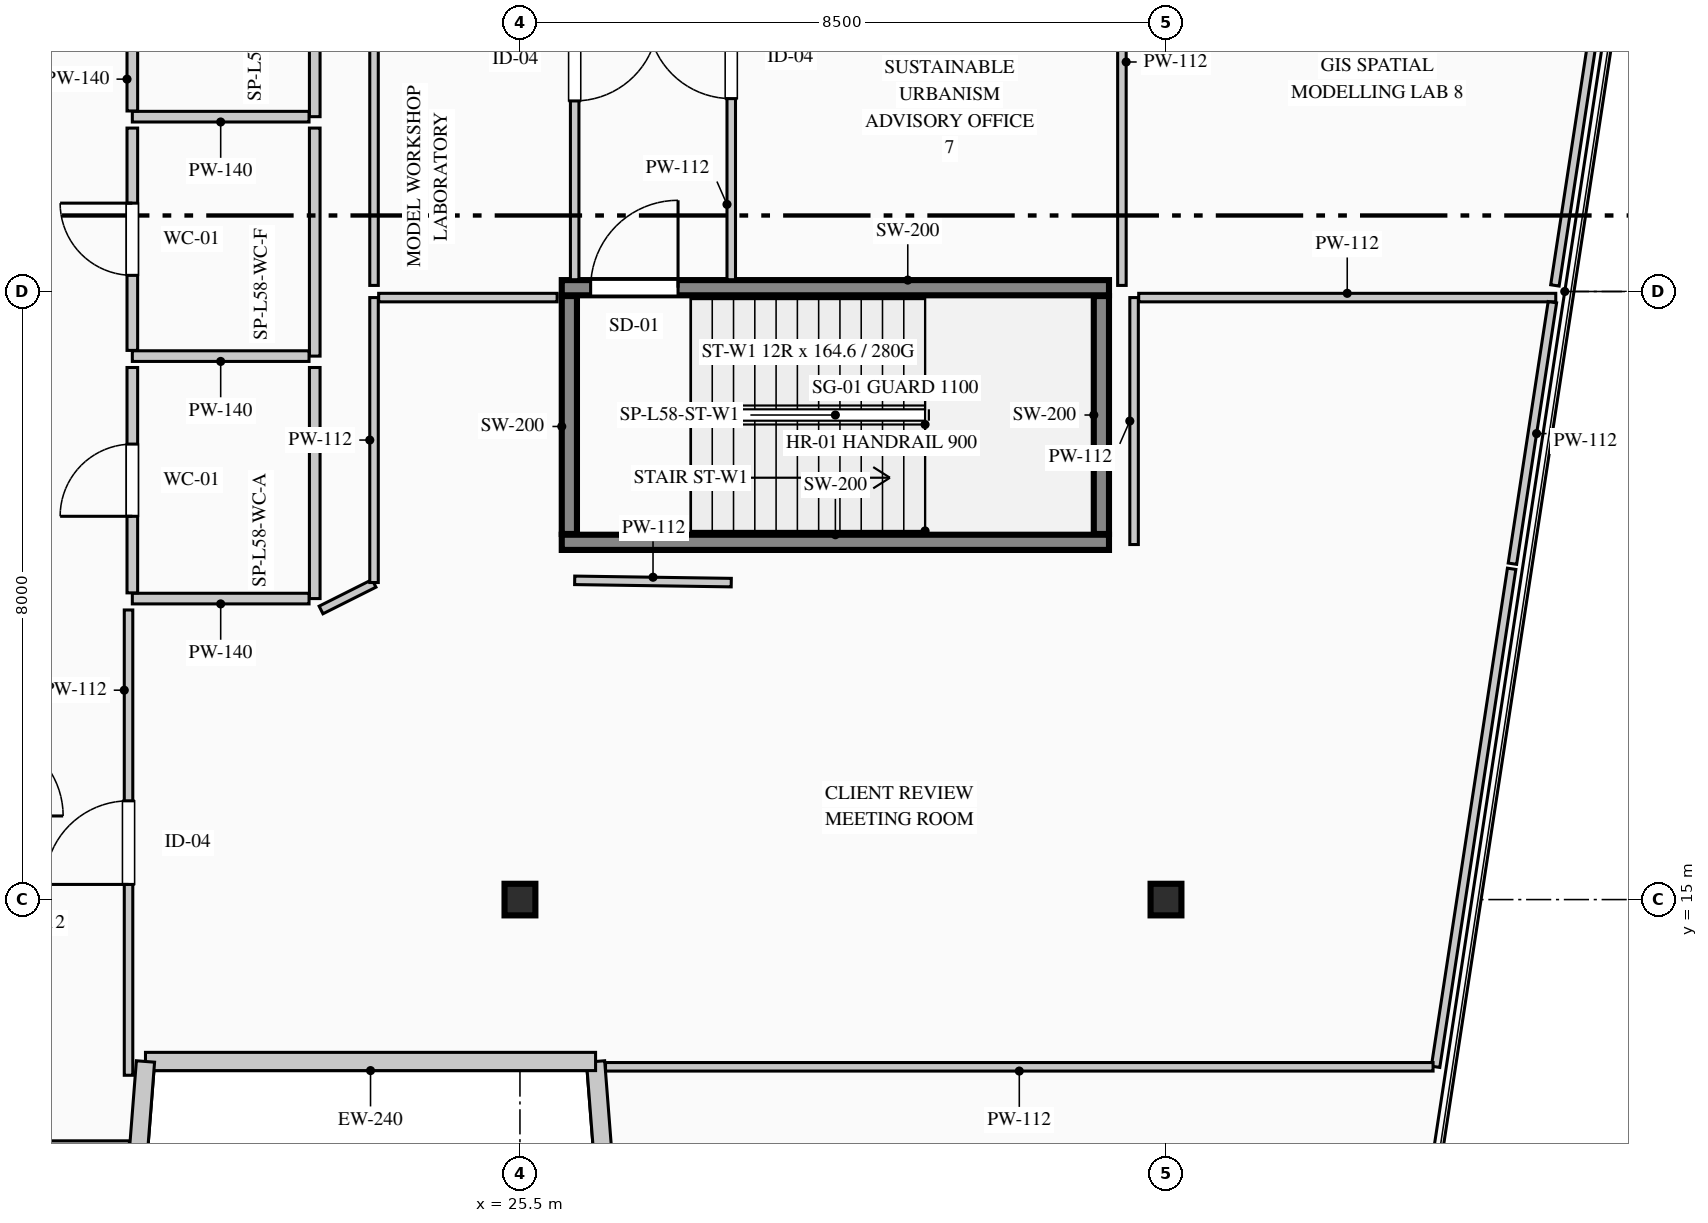
"""IFC4 building model, lengths in metres.
Left out: names, types, materials, properties, quantities, classifications, styles, units other than length and angle.
Written with IfcOpenShell. Run it as: python <this file> out.ifc"""

import sys

from ifc_helpers import new_model, si_unit, direction, frame, frame_2d, origin, origin_2d, place, context, subcontext, project, spatial, rectangle, i_section, extrude, element, fill, save


model = new_model("IFC4")
c1 = context("Model", 3, precision=1e-05, world=origin(), true_north=direction((0.0, 1.0)))
c2 = subcontext(c1, "Body", "Model", "MODEL_VIEW")
j1 = project(units=[si_unit("LENGTHUNIT", "METRE"), si_unit("PLANEANGLEUNIT", "RADIAN")], contexts=[c1])
p1 = place(None, origin())
s1 = spatial("IfcSite", under=j1, at=p1, CompositionType="ELEMENT")
p2 = place(p1, origin())
s2 = spatial("IfcBuilding", under=s1, at=p2, CompositionType="ELEMENT")
p3 = place(p2, frame((0.0, 0.0, 243.0)))
s3 = spatial("IfcBuildingStorey", under=s2, at=p3, CompositionType="ELEMENT", Elevation=243.0)
p4 = place(p3, frame((26.05, 19.7, 0.0), z_axis=(0.0, 0.0, 1.0), x_axis=(1.0, 0.0, 0.0)))
e1 = element("IfcWall", 1, at=p4, inside=s3, PredefinedType="SHEAR", context=c2, shape_type="SweptSolid", body=[
    extrude(rectangle(XDim=7.2, YDim=0.2, at=frame_2d((3.6, 0.0))), origin(), (0.0, 0.0, 1.0), 3.95),
])
p5 = place(p3, frame((26.05, 23.05, 0.0), z_axis=(0.0, 0.0, 1.0), x_axis=(1.0, 0.0, 0.0)))
e2 = element("IfcWall", 2, at=p5, inside=s3, PredefinedType="SHEAR", context=c2, shape_type="SweptSolid", body=[
    extrude(rectangle(XDim=7.2, YDim=0.2, at=frame_2d((3.6, 0.0))), origin(), (0.0, 0.0, 1.0), 3.95),
])
p6 = place(p5, frame((0.38, 0.0, 0.0)))
e3 = element("IfcOpeningElement", 3, at=p6, cuts=e2, PredefinedType="OPENING", context=c2, shape_type="SweptSolid", body=[
    extrude(rectangle(XDim=1.15, YDim=2.2, at=frame_2d((0.575, 1.1))), frame((0.0, 0.11, 0.0), z_axis=(0.0, -1.0, 0.0), x_axis=(1.0, 0.0, 0.0)), (0.0, 0.0, 1.0), 0.22),
])
for number, where, z_axis, x_axis in (
    (4, (26.15, 19.81, 0.0), (0.0, 0.0, 1.0), (0.0, 1.0, 0.0)),
    (5, (33.15, 19.81, 0.0), (0.0, 0.0, 1.0), (0.0, 1.0, 0.0)),
):
    element("IfcWall", number, at=place(p3, frame(where, z_axis=z_axis, x_axis=x_axis)), inside=s3, PredefinedType="SHEAR", context=c2, shape_type="SweptSolid", body=[
        extrude(rectangle(XDim=3.13, YDim=0.2, at=frame_2d((1.565, 0.0))), origin(), (0.0, 0.0, 1.0), 3.95),
    ])
for number, where, z_axis, x_axis in (
    (6, (25.5, 15.0, 0.0), (0.0, 0.0, 1.0), (1.0, 0.0, 0.0)),
    (7, (34.0, 15.0, 0.0), (0.0, 0.0, 1.0), (1.0, 0.0, 0.0)),
):
    element("IfcColumn", number, at=place(p3, frame(where, z_axis=z_axis, x_axis=x_axis)), inside=s3, PredefinedType="COLUMN", context=c2, shape_type="SweptSolid", body=[
        extrude(i_section(OverallWidth=0.406, OverallDepth=0.416, WebThickness=0.03, FlangeThickness=0.048, FilletRadius=0.015, at=origin_2d()), origin(), (0.0, 0.0, 1.0), 3.95),
    ])
p7 = place(p3, frame((27.295, 2.62, 0.0), z_axis=(0.0, 0.0, 1.0), x_axis=(-0.077793257511, 0.996969512616, 0.0)))
e8 = element("IfcWall", 8, at=p7, inside=s3, PredefinedType="STANDARD", context=c2, shape_type="SweptSolid", body=[
    extrude(rectangle(XDim=10.281, YDim=0.24, at=frame_2d((5.141, 0.0))), origin(), (0.0, 0.0, 1.0), 3.7),
])
p8 = place(p7, frame((5.755, 0.0, 0.9)))
e9 = element("IfcOpeningElement", 9, at=p8, cuts=e8, PredefinedType="OPENING", context=c2, shape_type="SweptSolid", body=[
    extrude(rectangle(XDim=1.65, YDim=1.95, at=frame_2d((0.825, 0.975))), frame((0.0, 0.13, 0.0), z_axis=(0.0, -1.0, 0.0), x_axis=(1.0, 0.0, 0.0)), (0.0, 0.0, 1.0), 0.26),
])
p9 = place(p3, frame((26.495, 12.87, 0.0), z_axis=(0.0, 0.0, 1.0), x_axis=(-1.0, 0.0, 0.0)))
e10 = element("IfcWall", 10, at=p9, inside=s3, PredefinedType="STANDARD", context=c2, shape_type="SweptSolid", body=[
    extrude(rectangle(XDim=5.922, YDim=0.24, at=frame_2d((2.961, 0.0))), origin(), (0.0, 0.0, 1.0), 3.7),
])
p10 = place(p3, frame((20.573, 12.87, 0.0), z_axis=(0.0, 0.0, 1.0), x_axis=(-0.077816860153, -0.996967670627, 0.0)))
e11 = element("IfcWall", 11, at=p10, inside=s3, PredefinedType="STANDARD", context=c2, shape_type="SweptSolid", body=[
    extrude(rectangle(XDim=10.281, YDim=0.24, at=frame_2d((5.141, 0.0))), origin(), (0.0, 0.0, 1.0), 3.7),
])
p11 = place(p10, frame((2.876, 0.0, 0.9)))
e12 = element("IfcOpeningElement", 12, at=p11, cuts=e11, PredefinedType="OPENING", context=c2, shape_type="SweptSolid", body=[
    extrude(rectangle(XDim=1.65, YDim=1.95, at=frame_2d((0.825, 0.975))), frame((0.0, 0.13, 0.0), z_axis=(0.0, -1.0, 0.0), x_axis=(1.0, 0.0, 0.0)), (0.0, 0.0, 1.0), 0.26),
])
p12 = place(p3, frame((22.8, 28.95, 0.0), z_axis=(0.0, 0.0, 1.0), x_axis=(0.0, -1.0, 0.0)))
e13 = element("IfcWall", 13, at=p12, inside=s3, PredefinedType="PARTITIONING", context=c2, shape_type="SweptSolid", body=[
    extrude(rectangle(XDim=3.65, YDim=0.14, at=frame_2d((1.825, 0.0))), origin(), (0.0, 0.0, 1.0), 3.385),
])
p13 = place(p3, frame((22.725, 25.3, 0.0), z_axis=(0.0, 0.0, 1.0), x_axis=(-1.0, 0.0, 0.0)))
e14 = element("IfcWall", 14, at=p13, inside=s3, PredefinedType="PARTITIONING", context=c2, shape_type="SweptSolid", body=[
    extrude(rectangle(XDim=2.325, YDim=0.14, at=frame_2d((1.163, 0.0))), origin(), (0.0, 0.0, 1.0), 3.7),
])
p14 = place(p3, frame((20.4, 25.375, 0.0), z_axis=(0.0, 0.0, 1.0), x_axis=(0.0, 1.0, 0.0)))
e15 = element("IfcWall", 15, at=p14, inside=s3, PredefinedType="PARTITIONING", context=c2, shape_type="SweptSolid", body=[
    extrude(rectangle(XDim=3.575, YDim=0.14, at=frame_2d((1.788, 0.0))), origin(), (0.0, 0.0, 1.0), 3.7),
])
p15 = place(p14, frame((1.312, 0.0, 0.0)))
e16 = element("IfcOpeningElement", 16, at=p15, cuts=e15, PredefinedType="OPENING", context=c2, shape_type="SweptSolid", body=[
    extrude(rectangle(XDim=0.95, YDim=2.15, at=frame_2d((0.475, 1.075))), frame((0.0, 0.08, 0.0), z_axis=(0.0, -1.0, 0.0), x_axis=(1.0, 0.0, 0.0)), (0.0, 0.0, 1.0), 0.16),
])
p16 = place(p3, frame((22.8, 25.15, 0.0), z_axis=(0.0, 0.0, 1.0), x_axis=(0.0, -1.0, 0.0)))
e17 = element("IfcWall", 17, at=p16, inside=s3, PredefinedType="PARTITIONING", context=c2, shape_type="SweptSolid", body=[
    extrude(rectangle(XDim=3.0, YDim=0.14, at=frame_2d((1.5, 0.0))), origin(), (0.0, 0.0, 1.0), 3.385),
])
p17 = place(p3, frame((22.725, 22.15, 0.0), z_axis=(0.0, 0.0, 1.0), x_axis=(-1.0, 0.0, 0.0)))
e18 = element("IfcWall", 18, at=p17, inside=s3, PredefinedType="PARTITIONING", context=c2, shape_type="SweptSolid", body=[
    extrude(rectangle(XDim=2.325, YDim=0.14, at=frame_2d((1.163, 0.0))), origin(), (0.0, 0.0, 1.0), 3.7),
])
p18 = place(p3, frame((20.4, 22.225, 0.0), z_axis=(0.0, 0.0, 1.0), x_axis=(0.0, 1.0, 0.0)))
e19 = element("IfcWall", 19, at=p18, inside=s3, PredefinedType="PARTITIONING", context=c2, shape_type="SweptSolid", body=[
    extrude(rectangle(XDim=2.925, YDim=0.14, at=frame_2d((1.462, 0.0))), origin(), (0.0, 0.0, 1.0), 3.7),
])
p19 = place(p18, frame((0.988, 0.0, 0.0)))
e20 = element("IfcOpeningElement", 20, at=p19, cuts=e19, PredefinedType="OPENING", context=c2, shape_type="SweptSolid", body=[
    extrude(rectangle(XDim=0.95, YDim=2.15, at=frame_2d((0.475, 1.075))), frame((0.0, 0.08, 0.0), z_axis=(0.0, -1.0, 0.0), x_axis=(1.0, 0.0, 0.0)), (0.0, 0.0, 1.0), 0.16),
])
p20 = place(p3, frame((22.8, 22.0, 0.0), z_axis=(0.0, 0.0, 1.0), x_axis=(0.0, -1.0, 0.0)))
e21 = element("IfcWall", 21, at=p20, inside=s3, PredefinedType="PARTITIONING", context=c2, shape_type="SweptSolid", body=[
    extrude(rectangle(XDim=3.04, YDim=0.14, at=frame_2d((1.52, 0.0))), origin(), (0.0, 0.0, 1.0), 3.385),
])
p21 = place(p3, frame((22.725, 18.96, 0.0), z_axis=(0.0, 0.0, 1.0), x_axis=(-1.0, 0.0, 0.0)))
e22 = element("IfcWall", 22, at=p21, inside=s3, PredefinedType="PARTITIONING", context=c2, shape_type="SweptSolid", body=[
    extrude(rectangle(XDim=2.325, YDim=0.14, at=frame_2d((1.163, 0.0))), origin(), (0.0, 0.0, 1.0), 3.7),
])
p22 = place(p3, frame((20.4, 19.035, 0.0), z_axis=(0.0, 0.0, 1.0), x_axis=(0.0, 1.0, 0.0)))
e23 = element("IfcWall", 23, at=p22, inside=s3, PredefinedType="PARTITIONING", context=c2, shape_type="SweptSolid", body=[
    extrude(rectangle(XDim=2.965, YDim=0.14, at=frame_2d((1.482, 0.0))), origin(), (0.0, 0.0, 1.0), 3.7),
])
p23 = place(p22, frame((1.008, 0.0, 0.0)))
e24 = element("IfcOpeningElement", 24, at=p23, cuts=e23, PredefinedType="OPENING", context=c2, shape_type="SweptSolid", body=[
    extrude(rectangle(XDim=0.95, YDim=2.15, at=frame_2d((0.475, 1.075))), frame((0.0, 0.08, 0.0), z_axis=(0.0, -1.0, 0.0), x_axis=(1.0, 0.0, 0.0)), (0.0, 0.0, 1.0), 0.16),
])
p24 = place(p3, frame((13.641, 11.77, 0.0), z_axis=(0.0, 0.0, 1.0), x_axis=(1.0, 0.0, 0.0)))
e25 = element("IfcWall", 25, at=p24, inside=s3, PredefinedType="PARTITIONING", context=c2, shape_type="SweptSolid", body=[
    extrude(rectangle(XDim=6.721, YDim=0.112, at=frame_2d((3.36, 0.0))), origin(), (0.0, 0.0, 1.0), 3.7),
])
p25 = place(p24, frame((2.81, 0.0, 0.0)))
e26 = element("IfcOpeningElement", 26, at=p25, cuts=e25, PredefinedType="OPENING", context=c2, shape_type="SweptSolid", body=[
    extrude(rectangle(XDim=1.1, YDim=2.2, at=frame_2d((0.55, 1.1))), frame((0.0, 0.066, 0.0), z_axis=(0.0, -1.0, 0.0), x_axis=(1.0, 0.0, 0.0)), (0.0, 0.0, 1.0), 0.132),
])
p26 = place(p3, frame((33.58, 19.671, 0.0), z_axis=(0.0, 0.0, 1.0), x_axis=(0.0, 1.0, 0.0)))
e27 = element("IfcWall", 27, at=p26, inside=s3, PredefinedType="PARTITIONING", context=c2, shape_type="SweptSolid", body=[
    extrude(rectangle(XDim=3.249, YDim=0.112, at=frame_2d((1.625, 0.0))), origin(), (0.0, 0.0, 1.0), 3.7),
])
p27 = place(p3, frame((33.641, 22.92, 0.0), z_axis=(0.0, 0.0, 1.0), x_axis=(1.0, 0.0, 0.0)))
e28 = element("IfcWall", 28, at=p27, inside=s3, PredefinedType="PARTITIONING", context=c2, shape_type="SweptSolid", body=[
    extrude(rectangle(XDim=5.487, YDim=0.112, at=frame_2d((2.744, 0.0))), origin(), (0.0, 0.0, 1.0), 3.7),
])
p28 = place(p3, frame((39.084, 22.859, 0.0), z_axis=(0.0, 0.0, 1.0), x_axis=(-0.151050155671, -0.988526100046, 0.0)))
e29 = element("IfcWall", 29, at=p28, inside=s3, PredefinedType="PARTITIONING", context=c2, shape_type="SweptSolid", body=[
    extrude(rectangle(XDim=3.48, YDim=0.112, at=frame_2d((1.74, 0.0))), origin(), (0.0, 0.0, 1.0), 3.7),
])
p29 = place(p3, frame((38.548, 19.352, 0.0), z_axis=(0.0, 0.0, 1.0), x_axis=(-0.150955405806, -0.988540573501, 0.0)))
e30 = element("IfcWall", 30, at=p29, inside=s3, PredefinedType="PARTITIONING", context=c2, shape_type="SweptSolid", body=[
    extrude(rectangle(XDim=6.628, YDim=0.112, at=frame_2d((3.314, 0.0))), origin(), (0.0, 0.0, 1.0), 3.7),
])
p30 = place(p3, frame((37.514, 12.8, 0.0), z_axis=(0.0, 0.0, 1.0), x_axis=(-1.0, 0.0, 0.0)))
e31 = element("IfcWall", 31, at=p30, inside=s3, PredefinedType="PARTITIONING", context=c2, shape_type="SweptSolid", body=[
    extrude(rectangle(XDim=10.888, YDim=0.112, at=frame_2d((5.444, 0.0))), origin(), (0.0, 0.0, 1.0), 3.7),
])
p31 = place(p3, frame((20.35, 12.689, 0.0), z_axis=(0.0, 0.0, 1.0), x_axis=(0.0, 1.0, 0.0)))
e32 = element("IfcWall", 32, at=p31, inside=s3, PredefinedType="PARTITIONING", context=c2, shape_type="SweptSolid", body=[
    extrude(rectangle(XDim=6.121, YDim=0.112, at=frame_2d((3.061, 0.0))), origin(), (0.0, 0.0, 1.0), 3.7),
])
p32 = place(p31, frame((2.511, 0.0, 0.0)))
e33 = element("IfcOpeningElement", 33, at=p32, cuts=e32, PredefinedType="OPENING", context=c2, shape_type="SweptSolid", body=[
    extrude(rectangle(XDim=1.1, YDim=2.2, at=frame_2d((0.55, 1.1))), frame((0.0, 0.066, 0.0), z_axis=(0.0, -1.0, 0.0), x_axis=(1.0, 0.0, 0.0)), (0.0, 0.0, 1.0), 0.132),
])
p33 = place(p3, frame((22.883, 18.81, 0.0), z_axis=(0.0, 0.0, 1.0), x_axis=(0.893737436086, 0.448590453909, 0.0)))
e34 = element("IfcWall", 34, at=p33, inside=s3, PredefinedType="PARTITIONING", context=c2, shape_type="SweptSolid", body=[
    extrude(rectangle(XDim=0.78, YDim=0.112, at=frame_2d((0.39, 0.0))), origin(), (0.0, 0.0, 1.0), 3.7),
])
p34 = place(p3, frame((23.58, 19.171, 0.0), z_axis=(0.0, 0.0, 1.0), x_axis=(0.0, 1.0, 0.0)))
e35 = element("IfcWall", 35, at=p34, inside=s3, PredefinedType="PARTITIONING", context=c2, shape_type="SweptSolid", body=[
    extrude(rectangle(XDim=3.749, YDim=0.112, at=frame_2d((1.875, 0.0))), origin(), (0.0, 0.0, 1.0), 3.7),
])
p35 = place(p3, frame((23.641, 22.92, 0.0), z_axis=(0.0, 0.0, 1.0), x_axis=(1.0, 0.0, 0.0)))
e36 = element("IfcWall", 36, at=p35, inside=s3, PredefinedType="PARTITIONING", context=c2, shape_type="SweptSolid", body=[
    extrude(rectangle(XDim=2.348, YDim=0.112, at=frame_2d((1.174, 0.0))), origin(), (0.0, 0.0, 1.0), 3.7),
])
p36 = place(p3, frame((26.22, 19.2, 0.0), z_axis=(0.0, 0.0, 1.0), x_axis=(0.999893773718, -0.014575365509, 0.0)))
e37 = element("IfcWall", 37, at=p36, inside=s3, PredefinedType="PARTITIONING", context=c2, shape_type="SweptSolid", body=[
    extrude(rectangle(XDim=2.06, YDim=0.112, at=frame_2d((1.03, 0.0))), origin(), (0.0, 0.0, 1.0), 3.385),
])
p37 = place(p3, frame((23.58, 23.08, 0.0), z_axis=(0.0, 0.0, 1.0), x_axis=(0.0, 1.0, 0.0)))
e38 = element("IfcWall", 38, at=p37, inside=s3, PredefinedType="PARTITIONING", context=c2, shape_type="SweptSolid", body=[
    extrude(rectangle(XDim=5.94, YDim=0.112, at=frame_2d((2.97, 0.0))), origin(), (0.0, 0.0, 1.0), 3.7),
])
p38 = place(p3, frame((26.22, 28.959, 0.0), z_axis=(0.0, 0.0, 1.0), x_axis=(0.0, -1.0, 0.0)))
e39 = element("IfcWall", 39, at=p38, inside=s3, PredefinedType="PARTITIONING", context=c2, shape_type="SweptSolid", body=[
    extrude(rectangle(XDim=5.804, YDim=0.112, at=frame_2d((2.902, 0.0))), origin(), (0.0, 0.0, 1.0), 3.7),
])
p39 = place(p38, frame((2.352, 0.0, 0.0)))
e40 = element("IfcOpeningElement", 40, at=p39, cuts=e39, PredefinedType="OPENING", context=c2, shape_type="SweptSolid", body=[
    extrude(rectangle(XDim=1.1, YDim=2.2, at=frame_2d((0.55, 1.1))), frame((0.0, 0.066, 0.0), z_axis=(0.0, -1.0, 0.0), x_axis=(1.0, 0.0, 0.0)), (0.0, 0.0, 1.0), 0.132),
])
p40 = place(p3, frame((28.28, 23.155, 0.0), z_axis=(0.0, 0.0, 1.0), x_axis=(0.0, 1.0, 0.0)))
e41 = element("IfcWall", 41, at=p40, inside=s3, PredefinedType="PARTITIONING", context=c2, shape_type="SweptSolid", body=[
    extrude(rectangle(XDim=5.865, YDim=0.112, at=frame_2d((2.933, 0.0))), origin(), (0.0, 0.0, 1.0), 3.7),
])
p41 = place(p40, frame((2.383, 0.0, 0.0)))
e42 = element("IfcOpeningElement", 42, at=p41, cuts=e41, PredefinedType="OPENING", context=c2, shape_type="SweptSolid", body=[
    extrude(rectangle(XDim=1.1, YDim=2.2, at=frame_2d((0.55, 1.1))), frame((0.0, 0.066, 0.0), z_axis=(0.0, -1.0, 0.0), x_axis=(1.0, 0.0, 0.0)), (0.0, 0.0, 1.0), 0.132),
])
p42 = place(p3, frame((33.42, 28.959, 0.0), z_axis=(0.0, 0.0, 1.0), x_axis=(0.0, -1.0, 0.0)))
e43 = element("IfcWall", 43, at=p42, inside=s3, PredefinedType="PARTITIONING", context=c2, shape_type="SweptSolid", body=[
    extrude(rectangle(XDim=5.879, YDim=0.112, at=frame_2d((2.939, 0.0))), origin(), (0.0, 0.0, 1.0), 3.7),
])
p43 = place(p3, frame((41.529, 38.867, 0.0), z_axis=(0.0, 0.0, 1.0), x_axis=(-0.151041582551, -0.98852741001, 0.0)))
e44 = element("IfcWall", 44, at=p43, inside=s3, PredefinedType="PARTITIONING", context=c2, shape_type="SweptSolid", body=[
    extrude(rectangle(XDim=15.97, YDim=0.112, at=frame_2d((7.985, 0.0))), origin(), (0.0, 0.0, 1.0), 3.7),
])
p44 = place(p6, origin())
e45 = element("IfcDoor", 45, at=p44, inside=s3, OperationType="SINGLE_SWING_RIGHT", PredefinedType="DOOR", context=c2, shape_type="SweptSolid", body=[
    extrude(rectangle(XDim=1.15, YDim=2.2, at=frame_2d((0.575, 1.1))), frame((0.0, 0.025, 0.0), z_axis=(0.0, -1.0, 0.0), x_axis=(1.0, 0.0, 0.0)), (0.0, 0.0, 1.0), 0.05),
])
fill(e3, e45)
p45 = place(p19, origin())
e46 = element("IfcDoor", 46, at=p45, inside=s3, OperationType="SINGLE_SWING_RIGHT", PredefinedType="DOOR", context=c2, shape_type="SweptSolid", body=[
    extrude(rectangle(XDim=0.95, YDim=2.15, at=frame_2d((0.475, 1.075))), frame((0.0, 0.025, 0.0), z_axis=(0.0, -1.0, 0.0), x_axis=(1.0, 0.0, 0.0)), (0.0, 0.0, 1.0), 0.05),
])
fill(e20, e46)
p46 = place(p23, origin())
e47 = element("IfcDoor", 47, at=p46, inside=s3, OperationType="SINGLE_SWING_LEFT", PredefinedType="DOOR", context=c2, shape_type="SweptSolid", body=[
    extrude(rectangle(XDim=0.95, YDim=2.15, at=frame_2d((0.475, 1.075))), frame((0.0, 0.025, 0.0), z_axis=(0.0, -1.0, 0.0), x_axis=(1.0, 0.0, 0.0)), (0.0, 0.0, 1.0), 0.05),
])
fill(e24, e47)
p47 = place(p32, origin())
e48 = element("IfcDoor", 48, at=p47, inside=s3, OperationType="SINGLE_SWING_LEFT", PredefinedType="DOOR", context=c2, shape_type="SweptSolid", body=[
    extrude(rectangle(XDim=1.1, YDim=2.2, at=frame_2d((0.55, 1.1))), frame((0.0, 0.025, 0.0), z_axis=(0.0, -1.0, 0.0), x_axis=(1.0, 0.0, 0.0)), (0.0, 0.0, 1.0), 0.05),
])
fill(e33, e48)
p48 = place(p39, origin())
e49 = element("IfcDoor", 49, at=p48, inside=s3, OperationType="SINGLE_SWING_LEFT", PredefinedType="DOOR", context=c2, shape_type="SweptSolid", body=[
    extrude(rectangle(XDim=1.1, YDim=2.2, at=frame_2d((0.55, 1.1))), frame((0.0, 0.025, 0.0), z_axis=(0.0, -1.0, 0.0), x_axis=(1.0, 0.0, 0.0)), (0.0, 0.0, 1.0), 0.05),
])
fill(e40, e49)
p49 = place(p41, origin())
e50 = element("IfcDoor", 50, at=p49, inside=s3, OperationType="SINGLE_SWING_RIGHT", PredefinedType="DOOR", context=c2, shape_type="SweptSolid", body=[
    extrude(rectangle(XDim=1.1, YDim=2.2, at=frame_2d((0.55, 1.1))), frame((0.0, 0.025, 0.0), z_axis=(0.0, -1.0, 0.0), x_axis=(1.0, 0.0, 0.0)), (0.0, 0.0, 1.0), 0.05),
])
fill(e42, e50)
save(model, sys.argv[1])
